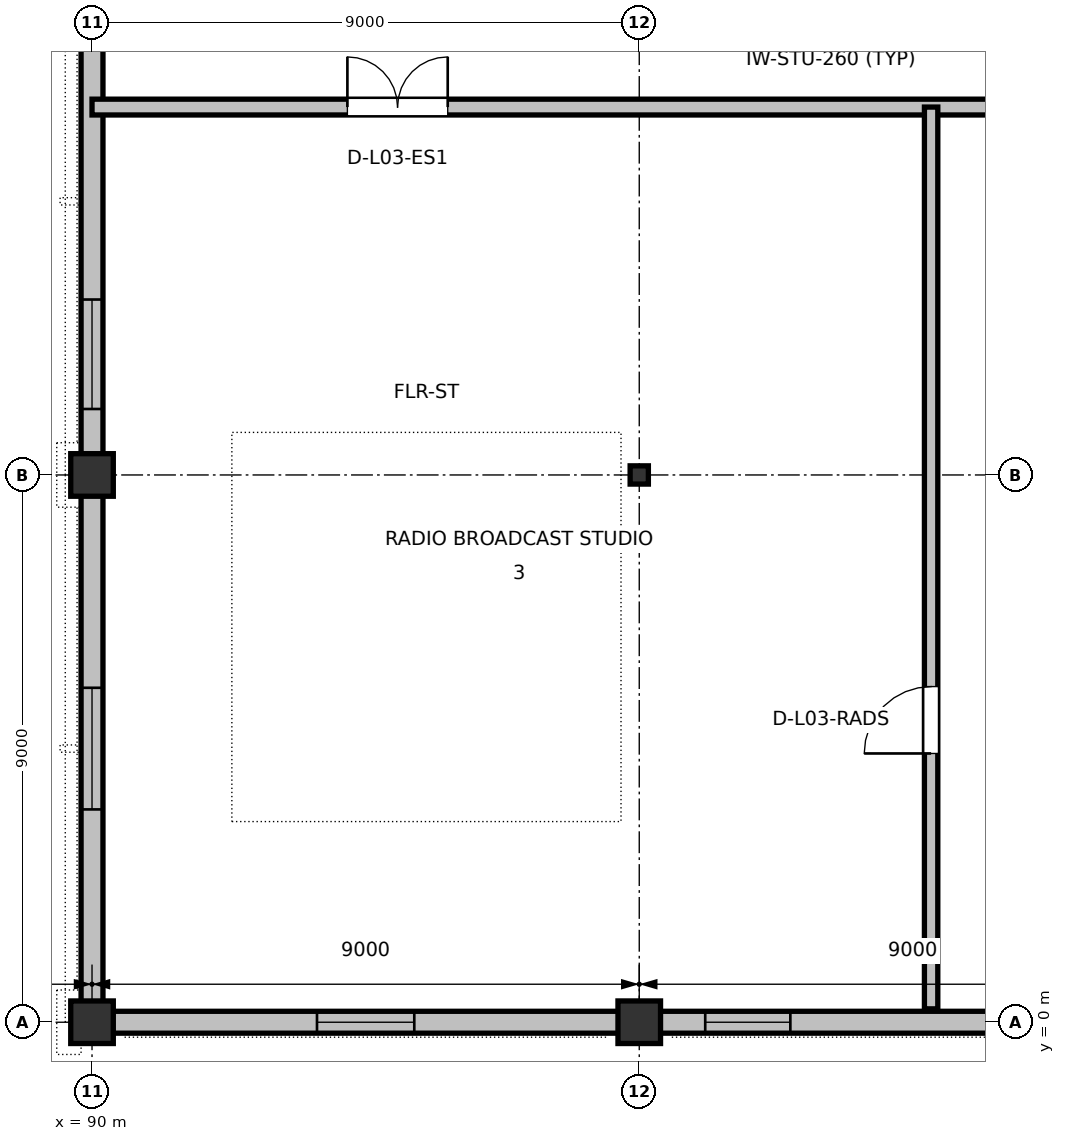
"""IFC4 building model, lengths in metres.
Left out: names, types, materials, properties, quantities, classifications, styles, units other than length and angle.
Written with IfcOpenShell. Run it as: python <this file> out.ifc"""

import sys

from ifc_helpers import new_model, si_unit, direction, frame, frame_2d, origin, origin_2d, place, context, subcontext, project, spatial, rectangle, i_section, extrude, element, fill, save


model = new_model("IFC4")
c1 = context("Model", 3, precision=1e-05, world=origin(), true_north=direction((0.0, 1.0)))
c2 = subcontext(c1, "Body", "Model", "MODEL_VIEW")
j1 = project(units=[si_unit("LENGTHUNIT", "METRE"), si_unit("PLANEANGLEUNIT", "RADIAN")], contexts=[c1])
p1 = place(None, origin())
s1 = spatial("IfcSite", under=j1, at=p1, CompositionType="ELEMENT")
p2 = place(p1, origin())
s2 = spatial("IfcBuilding", under=s1, at=p2, CompositionType="ELEMENT")
p3 = place(p2, frame((0.0, 0.0, 15.0)))
s3 = spatial("IfcBuildingStorey", under=s2, at=p3, CompositionType="ELEMENT", Elevation=15.0)
for number, where, z_axis, x_axis in (
    (1, (90.0, 0.0, 0.0), (0.0, 0.0, 1.0), (1.0, 0.0, 0.0)),
    (2, (90.0, 9.0, 0.0), (0.0, 0.0, 1.0), (1.0, 0.0, 0.0)),
    (3, (99.0, 0.0, 0.0), (0.0, 0.0, 1.0), (1.0, 0.0, 0.0)),
):
    element("IfcColumn", number, at=place(p3, frame(where, z_axis=z_axis, x_axis=x_axis)), inside=s3, PredefinedType="COLUMN", context=c2, shape_type="SweptSolid", body=[
        extrude(rectangle(XDim=0.7, YDim=0.7, at=origin_2d()), origin(), (0.0, 0.0, 1.0), 4.2),
    ])
p4 = place(p3, frame((99.0, 9.0, 0.0), z_axis=(0.0, 0.0, 1.0), x_axis=(1.0, 0.0, 0.0)))
e4 = element("IfcColumn", 4, at=p4, inside=s3, PredefinedType="COLUMN", context=c2, shape_type="SweptSolid", body=[
    extrude(i_section(OverallWidth=0.3, OverallDepth=0.3, WebThickness=0.011, FlangeThickness=0.019, at=origin_2d()), origin(), (0.0, 0.0, 1.0), 4.2),
])
p5 = place(p3, frame((90.0, 8.665, 0.0), z_axis=(0.0, 0.0, 1.0), x_axis=(0.0, -1.0, 0.0)))
e5 = element("IfcWall", 5, at=p5, inside=s3, PredefinedType="STANDARD", context=c2, shape_type="SweptSolid", body=[
    extrude(rectangle(XDim=8.33, YDim=0.36, at=frame_2d((4.165, 0.0))), origin(), (0.0, 0.0, 1.0), 3.635),
])
p6 = place(p5, frame((3.165, 0.0, 0.9)))
e6 = element("IfcOpeningElement", 6, at=p6, cuts=e5, PredefinedType="OPENING", context=c2, shape_type="SweptSolid", body=[
    extrude(rectangle(XDim=2.0, YDim=1.6, at=frame_2d((1.0, 0.8))), frame((0.0, 0.19, 0.0), z_axis=(0.0, -1.0, 0.0), x_axis=(1.0, 0.0, 0.0)), (0.0, 0.0, 1.0), 0.38),
])
p7 = place(p3, frame((90.0, 17.665, 0.0), z_axis=(0.0, 0.0, 1.0), x_axis=(0.0, -1.0, 0.0)))
e7 = element("IfcWall", 7, at=p7, inside=s3, PredefinedType="STANDARD", context=c2, shape_type="SweptSolid", body=[
    extrude(rectangle(XDim=8.33, YDim=0.36, at=frame_2d((4.165, 0.0))), origin(), (0.0, 0.0, 1.0), 3.635),
])
p8 = place(p7, frame((5.78, 0.0, 0.9)))
e8 = element("IfcOpeningElement", 8, at=p8, cuts=e7, PredefinedType="OPENING", context=c2, shape_type="SweptSolid", body=[
    extrude(rectangle(XDim=1.8, YDim=1.55, at=frame_2d((0.9, 0.775))), frame((0.0, 0.19, 0.0), z_axis=(0.0, -1.0, 0.0), x_axis=(1.0, 0.0, 0.0)), (0.0, 0.0, 1.0), 0.38),
])
p9 = place(p3, frame((90.335, 0.0, 0.0), z_axis=(0.0, 0.0, 1.0), x_axis=(1.0, 0.0, 0.0)))
e9 = element("IfcWall", 9, at=p9, inside=s3, PredefinedType="STANDARD", context=c2, shape_type="SweptSolid", body=[
    extrude(rectangle(XDim=8.33, YDim=0.36, at=frame_2d((4.165, 0.0))), origin(), (0.0, 0.0, 1.0), 3.635),
])
p10 = place(p9, frame((3.365, 0.0, 0.9)))
e10 = element("IfcOpeningElement", 10, at=p10, cuts=e9, PredefinedType="OPENING", context=c2, shape_type="SweptSolid", body=[
    extrude(rectangle(XDim=1.6, YDim=1.5, at=frame_2d((0.8, 0.75))), frame((0.0, 0.19, 0.0), z_axis=(0.0, -1.0, 0.0), x_axis=(1.0, 0.0, 0.0)), (0.0, 0.0, 1.0), 0.38),
])
p11 = place(p3, frame((99.335, 0.0, 0.0), z_axis=(0.0, 0.0, 1.0), x_axis=(1.0, 0.0, 0.0)))
e11 = element("IfcWall", 11, at=p11, inside=s3, PredefinedType="STANDARD", context=c2, shape_type="SweptSolid", body=[
    extrude(rectangle(XDim=8.33, YDim=0.36, at=frame_2d((4.165, 0.0))), origin(), (0.0, 0.0, 1.0), 3.635),
])
p12 = place(p11, frame((0.75, 0.0, 0.9)))
e12 = element("IfcOpeningElement", 12, at=p12, cuts=e11, PredefinedType="OPENING", context=c2, shape_type="SweptSolid", body=[
    extrude(rectangle(XDim=1.4, YDim=1.45, at=frame_2d((0.7, 0.725))), frame((0.0, 0.19, 0.0), z_axis=(0.0, -1.0, 0.0), x_axis=(1.0, 0.0, 0.0)), (0.0, 0.0, 1.0), 0.38),
])
p13 = place(p3, frame((90.0, 15.05, 0.0), z_axis=(0.0, 0.0, 1.0), x_axis=(1.0, 0.0, 0.0)))
e13 = element("IfcWall", 13, at=p13, inside=s3, PredefinedType="PARTITIONING", context=c2, shape_type="SweptSolid", body=[
    extrude(rectangle(XDim=24.3, YDim=0.26, at=frame_2d((12.15, 0.0))), origin(), (0.0, 0.0, 1.0), 3.645),
])
p14 = place(p13, frame((4.2, 0.0, 0.0)))
e14 = element("IfcOpeningElement", 14, at=p14, cuts=e13, PredefinedType="OPENING", context=c2, shape_type="SweptSolid", body=[
    extrude(rectangle(XDim=1.65, YDim=2.25, at=frame_2d((0.825, 1.125))), frame((0.0, 0.14, 0.0), z_axis=(0.0, -1.0, 0.0), x_axis=(1.0, 0.0, 0.0)), (0.0, 0.0, 1.0), 0.28),
])
p15 = place(p13, frame((16.5, 0.0, 0.0)))
e15 = element("IfcOpeningElement", 15, at=p15, cuts=e13, PredefinedType="OPENING", context=c2, shape_type="SweptSolid", body=[
    extrude(rectangle(XDim=1.45, YDim=2.22, at=frame_2d((0.725, 1.11))), frame((0.0, 0.14, 0.0), z_axis=(0.0, -1.0, 0.0), x_axis=(1.0, 0.0, 0.0)), (0.0, 0.0, 1.0), 0.28),
])
p16 = place(p3, frame((103.8, 0.22, 0.0), z_axis=(0.0, 0.0, 1.0), x_axis=(0.0, 1.0, 0.0)))
e16 = element("IfcWall", 16, at=p16, inside=s3, PredefinedType="PARTITIONING", context=c2, shape_type="SweptSolid", body=[
    extrude(rectangle(XDim=14.83, YDim=0.22, at=frame_2d((7.415, 0.0))), origin(), (0.0, 0.0, 1.0), 3.96),
])
p17 = place(p16, frame((4.2, 0.0, 0.0)))
e17 = element("IfcOpeningElement", 17, at=p17, cuts=e16, PredefinedType="OPENING", context=c2, shape_type="SweptSolid", body=[
    extrude(rectangle(XDim=1.1, YDim=2.16, at=frame_2d((0.55, 1.08))), frame((0.0, 0.12, 0.0), z_axis=(0.0, -1.0, 0.0), x_axis=(1.0, 0.0, 0.0)), (0.0, 0.0, 1.0), 0.24),
])
p18 = place(p6, origin())
e18 = element("IfcWindow", 18, at=p18, inside=s3, PartitioningType="SINGLE_PANEL", PredefinedType="WINDOW", context=c2, shape_type="SweptSolid", body=[
    extrude(rectangle(XDim=2.0, YDim=1.6, at=frame_2d((1.0, 0.8))), frame((0.0, 0.03, 0.0), z_axis=(0.0, -1.0, 0.0), x_axis=(1.0, 0.0, 0.0)), (0.0, 0.0, 1.0), 0.06),
])
fill(e6, e18)
p19 = place(p8, origin())
e19 = element("IfcWindow", 19, at=p19, inside=s3, PartitioningType="SINGLE_PANEL", PredefinedType="WINDOW", context=c2, shape_type="SweptSolid", body=[
    extrude(rectangle(XDim=1.8, YDim=1.55, at=frame_2d((0.9, 0.775))), frame((0.0, 0.03, 0.0), z_axis=(0.0, -1.0, 0.0), x_axis=(1.0, 0.0, 0.0)), (0.0, 0.0, 1.0), 0.06),
])
fill(e8, e19)
p20 = place(p10, origin())
e20 = element("IfcWindow", 20, at=p20, inside=s3, PartitioningType="SINGLE_PANEL", PredefinedType="WINDOW", context=c2, shape_type="SweptSolid", body=[
    extrude(rectangle(XDim=1.6, YDim=1.5, at=frame_2d((0.8, 0.75))), frame((0.0, 0.03, 0.0), z_axis=(0.0, -1.0, 0.0), x_axis=(1.0, 0.0, 0.0)), (0.0, 0.0, 1.0), 0.06),
])
fill(e10, e20)
p21 = place(p12, origin())
e21 = element("IfcWindow", 21, at=p21, inside=s3, PartitioningType="SINGLE_PANEL", PredefinedType="WINDOW", context=c2, shape_type="SweptSolid", body=[
    extrude(rectangle(XDim=1.4, YDim=1.45, at=frame_2d((0.7, 0.725))), frame((0.0, 0.03, 0.0), z_axis=(0.0, -1.0, 0.0), x_axis=(1.0, 0.0, 0.0)), (0.0, 0.0, 1.0), 0.06),
])
fill(e12, e21)
p22 = place(p14, origin())
e22 = element("IfcDoor", 22, at=p22, inside=s3, OperationType="DOUBLE_DOOR_SINGLE_SWING", PredefinedType="DOOR", context=c2, shape_type="SweptSolid", body=[
    extrude(rectangle(XDim=1.65, YDim=2.25, at=frame_2d((0.825, 1.125))), frame((0.0, 0.025, 0.0), z_axis=(0.0, -1.0, 0.0), x_axis=(1.0, 0.0, 0.0)), (0.0, 0.0, 1.0), 0.05),
])
fill(e14, e22)
p23 = place(p17, origin())
e23 = element("IfcDoor", 23, at=p23, inside=s3, OperationType="SINGLE_SWING_LEFT", PredefinedType="DOOR", context=c2, shape_type="SweptSolid", body=[
    extrude(rectangle(XDim=1.1, YDim=2.16, at=frame_2d((0.55, 1.08))), frame((0.0, 0.025, 0.0), z_axis=(0.0, -1.0, 0.0), x_axis=(1.0, 0.0, 0.0)), (0.0, 0.0, 1.0), 0.05),
])
fill(e17, e23)
save(model, sys.argv[1])
